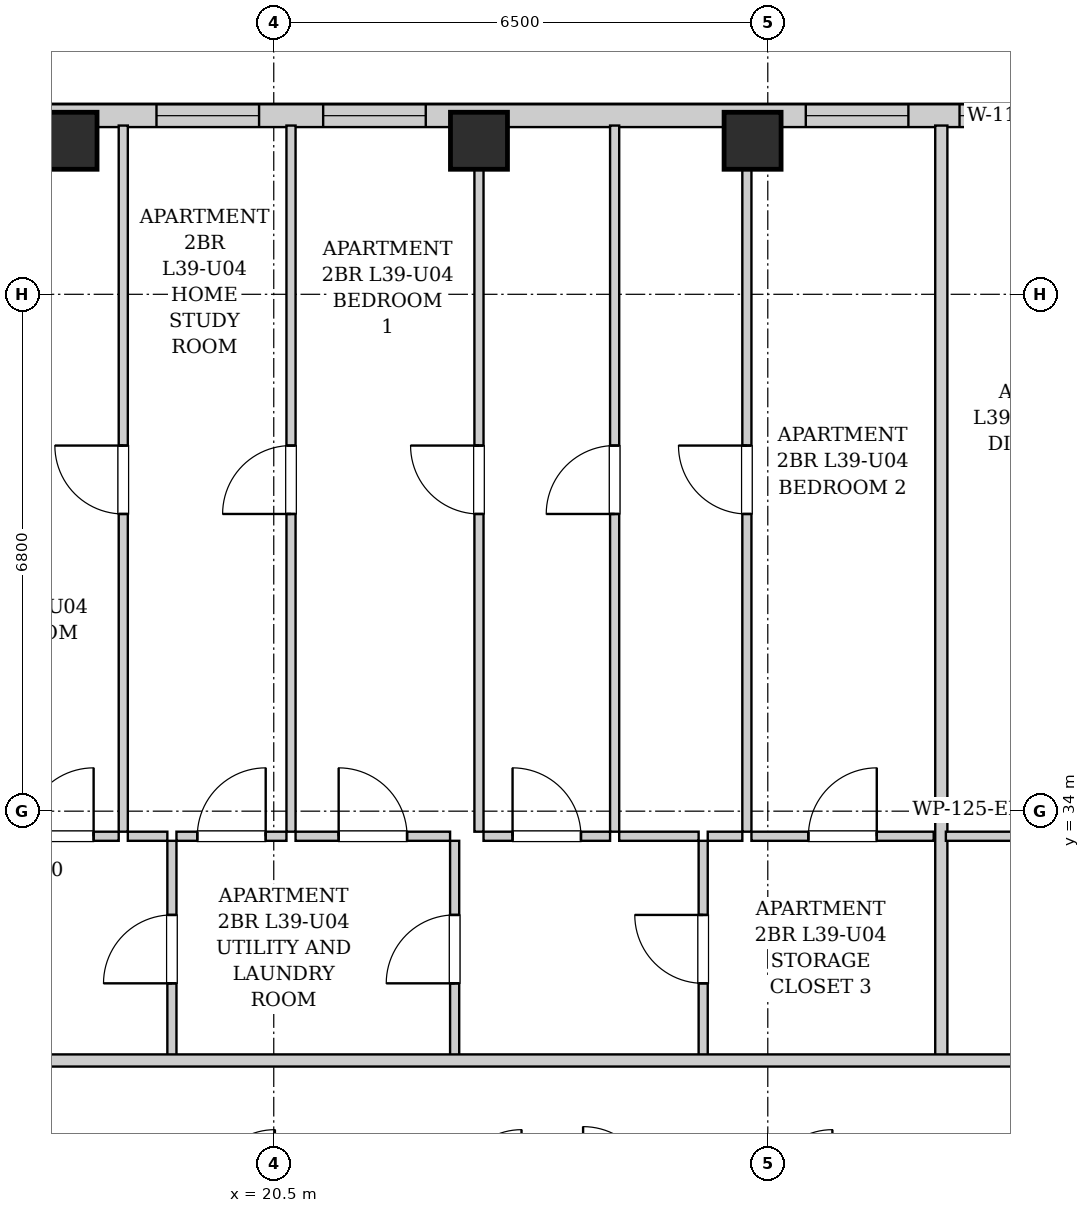
"""IFC4 building model, lengths in metres.
Left out: names, types, materials, properties, quantities, classifications, styles, units other than length and angle.
Written with IfcOpenShell. Run it as: python <this file> out.ifc"""

import sys

from ifc_helpers import new_model, si_unit, direction, frame, frame_2d, origin, origin_2d, place, context, subcontext, project, spatial, rectangle, extrude, element, fill, save


model = new_model("IFC4")
c1 = context("Model", 3, precision=1e-05, world=origin(), true_north=direction((0.0, 1.0)))
c2 = subcontext(c1, "Body", "Model", "MODEL_VIEW")
j1 = project(units=[si_unit("LENGTHUNIT", "METRE"), si_unit("PLANEANGLEUNIT", "RADIAN")], contexts=[c1])
p1 = place(None, origin())
s1 = spatial("IfcSite", under=j1, at=p1, CompositionType="ELEMENT")
p2 = place(p1, origin())
s2 = spatial("IfcBuilding", under=s1, at=p2, CompositionType="ELEMENT")
p3 = place(p2, frame((0.0, 0.0, 137.4)))
s3 = spatial("IfcBuildingStorey", under=s2, at=p3, CompositionType="ELEMENT", Elevation=137.4)
for number, where, z_axis, x_axis in (
    (1, (17.8, 42.82, 0.0), (0.0, 0.0, 1.0), (1.0, 0.0, 0.0)),
    (2, (23.2, 42.82, 0.0), (0.0, 0.0, 1.0), (1.0, 0.0, 0.0)),
    (3, (26.8, 42.82, 0.0), (0.0, 0.0, 1.0), (1.0, 0.0, 0.0)),
):
    element("IfcColumn", number, at=place(p3, frame(where, z_axis=z_axis, x_axis=x_axis)), inside=s3, PredefinedType="COLUMN", context=c2, shape_type="SweptSolid", body=[
        extrude(rectangle(XDim=0.75, YDim=0.75, at=origin_2d()), origin(), (0.0, 0.0, 1.0), 3.25),
    ])
p4 = place(p3, frame((16.6, 43.15, 0.0), z_axis=(0.0, 0.0, 1.0), x_axis=(1.0, 0.0, 0.0)))
e4 = element("IfcWall", 4, at=p4, inside=s3, PredefinedType="SOLIDWALL", context=c2, shape_type="SweptSolid", body=[
    extrude(rectangle(XDim=14.1, YDim=0.3, at=frame_2d((7.05, 0.0))), origin(), (0.0, 0.0, 1.0), 2.99),
])
p5 = place(p4, frame((2.357, 0.0, 0.55)))
e5 = element("IfcOpeningElement", 5, at=p5, cuts=e4, PredefinedType="OPENING", context=c2, shape_type="SweptSolid", body=[
    extrude(rectangle(XDim=1.35, YDim=1.2, at=frame_2d((0.675, 0.6))), frame((0.0, 0.16, 0.0), z_axis=(0.0, -1.0, 0.0), x_axis=(1.0, 0.0, 0.0)), (0.0, 0.0, 1.0), 0.32),
])
p6 = place(p4, frame((4.55, 0.0, 0.55)))
e6 = element("IfcOpeningElement", 6, at=p6, cuts=e4, PredefinedType="OPENING", context=c2, shape_type="SweptSolid", body=[
    extrude(rectangle(XDim=1.35, YDim=1.2, at=frame_2d((0.675, 0.6))), frame((0.0, 0.16, 0.0), z_axis=(0.0, -1.0, 0.0), x_axis=(1.0, 0.0, 0.0)), (0.0, 0.0, 1.0), 0.32),
])
p7 = place(p4, frame((10.9, 0.0, 0.55)))
e7 = element("IfcOpeningElement", 7, at=p7, cuts=e4, PredefinedType="OPENING", context=c2, shape_type="SweptSolid", body=[
    extrude(rectangle(XDim=1.35, YDim=1.2, at=frame_2d((0.675, 0.6))), frame((0.0, 0.16, 0.0), z_axis=(0.0, -1.0, 0.0), x_axis=(1.0, 0.0, 0.0)), (0.0, 0.0, 1.0), 0.32),
])
p8 = place(p4, frame((12.923, 0.0, 0.55)))
e8 = element("IfcOpeningElement", 8, at=p8, cuts=e4, PredefinedType="OPENING", context=c2, shape_type="SweptSolid", body=[
    extrude(rectangle(XDim=0.85, YDim=1.2, at=frame_2d((0.425, 0.6))), frame((0.0, 0.16, 0.0), z_axis=(0.0, -1.0, 0.0), x_axis=(1.0, 0.0, 0.0)), (0.0, 0.0, 1.0), 0.32),
])
p9 = place(p3, frame((19.16, 30.76, 0.0), z_axis=(0.0, 0.0, 1.0), x_axis=(0.0, 1.0, 0.0)))
e9 = element("IfcWall", 9, at=p9, inside=s3, PredefinedType="PARTITIONING", context=c2, shape_type="SweptSolid", body=[
    extrude(rectangle(XDim=2.85, YDim=0.12, at=frame_2d((1.425, 0.0))), origin(), (0.0, 0.0, 1.0), 2.99),
])
p10 = place(p9, frame((0.975, 0.0, 0.0)))
e10 = element("IfcOpeningElement", 10, at=p10, cuts=e9, PredefinedType="OPENING", context=c2, shape_type="SweptSolid", body=[
    extrude(rectangle(XDim=0.9, YDim=2.05, at=frame_2d((0.45, 1.025))), frame((0.0, 0.07, 0.0), z_axis=(0.0, -1.0, 0.0), x_axis=(1.0, 0.0, 0.0)), (0.0, 0.0, 1.0), 0.14),
])
p11 = place(p3, frame((16.9, 33.67, 0.0), z_axis=(0.0, 0.0, 1.0), x_axis=(1.0, 0.0, 0.0)))
e11 = element("IfcWall", 11, at=p11, inside=s3, PredefinedType="PARTITIONING", context=c2, shape_type="SweptSolid", body=[
    extrude(rectangle(XDim=1.56, YDim=0.12, at=frame_2d((0.78, 0.0))), origin(), (0.0, 0.0, 1.0), 2.99),
])
p12 = place(p11, frame((0.33, 0.0, 0.0)))
e12 = element("IfcOpeningElement", 12, at=p12, cuts=e11, PredefinedType="OPENING", context=c2, shape_type="SweptSolid", body=[
    extrude(rectangle(XDim=0.9, YDim=2.05, at=frame_2d((0.45, 1.025))), frame((0.0, 0.07, 0.0), z_axis=(0.0, -1.0, 0.0), x_axis=(1.0, 0.0, 0.0)), (0.0, 0.0, 1.0), 0.14),
])
p13 = place(p3, frame((18.58, 33.67, 0.0), z_axis=(0.0, 0.0, 1.0), x_axis=(1.0, 0.0, 0.0)))
e13 = element("IfcWall", 13, at=p13, inside=s3, PredefinedType="PARTITIONING", context=c2, shape_type="SweptSolid", body=[
    extrude(rectangle(XDim=0.52, YDim=0.12, at=frame_2d((0.26, 0.0))), origin(), (0.0, 0.0, 1.0), 2.99),
])
p14 = place(p3, frame((22.88, 30.76, 0.0), z_axis=(0.0, 0.0, 1.0), x_axis=(0.0, 1.0, 0.0)))
e14 = element("IfcWall", 14, at=p14, inside=s3, PredefinedType="PARTITIONING", context=c2, shape_type="SweptSolid", body=[
    extrude(rectangle(XDim=2.85, YDim=0.12, at=frame_2d((1.425, 0.0))), origin(), (0.0, 0.0, 1.0), 2.99),
])
p15 = place(p14, frame((0.975, 0.0, 0.0)))
e15 = element("IfcOpeningElement", 15, at=p15, cuts=e14, PredefinedType="OPENING", context=c2, shape_type="SweptSolid", body=[
    extrude(rectangle(XDim=0.9, YDim=2.05, at=frame_2d((0.45, 1.025))), frame((0.0, 0.07, 0.0), z_axis=(0.0, -1.0, 0.0), x_axis=(1.0, 0.0, 0.0)), (0.0, 0.0, 1.0), 0.14),
])
p16 = place(p3, frame((19.22, 33.67, 0.0), z_axis=(0.0, 0.0, 1.0), x_axis=(1.0, 0.0, 0.0)))
e16 = element("IfcWall", 16, at=p16, inside=s3, PredefinedType="PARTITIONING", context=c2, shape_type="SweptSolid", body=[
    extrude(rectangle(XDim=1.447, YDim=0.12, at=frame_2d((0.724, 0.0))), origin(), (0.0, 0.0, 1.0), 2.99),
])
p17 = place(p16, frame((0.274, 0.0, 0.0)))
e17 = element("IfcOpeningElement", 17, at=p17, cuts=e16, PredefinedType="OPENING", context=c2, shape_type="SweptSolid", body=[
    extrude(rectangle(XDim=0.9, YDim=2.05, at=frame_2d((0.45, 1.025))), frame((0.0, 0.07, 0.0), z_axis=(0.0, -1.0, 0.0), x_axis=(1.0, 0.0, 0.0)), (0.0, 0.0, 1.0), 0.14),
])
p18 = place(p3, frame((20.787, 33.67, 0.0), z_axis=(0.0, 0.0, 1.0), x_axis=(1.0, 0.0, 0.0)))
e18 = element("IfcWall", 18, at=p18, inside=s3, PredefinedType="PARTITIONING", context=c2, shape_type="SweptSolid", body=[
    extrude(rectangle(XDim=2.033, YDim=0.12, at=frame_2d((1.017, 0.0))), origin(), (0.0, 0.0, 1.0), 2.99),
])
p19 = place(p18, frame((0.567, 0.0, 0.0)))
e19 = element("IfcOpeningElement", 19, at=p19, cuts=e18, PredefinedType="OPENING", context=c2, shape_type="SweptSolid", body=[
    extrude(rectangle(XDim=0.9, YDim=2.05, at=frame_2d((0.45, 1.025))), frame((0.0, 0.07, 0.0), z_axis=(0.0, -1.0, 0.0), x_axis=(1.0, 0.0, 0.0)), (0.0, 0.0, 1.0), 0.14),
])
p20 = place(p3, frame((26.15, 30.76, 0.0), z_axis=(0.0, 0.0, 1.0), x_axis=(0.0, 1.0, 0.0)))
e20 = element("IfcWall", 20, at=p20, inside=s3, PredefinedType="PARTITIONING", context=c2, shape_type="SweptSolid", body=[
    extrude(rectangle(XDim=2.85, YDim=0.12, at=frame_2d((1.425, 0.0))), origin(), (0.0, 0.0, 1.0), 2.99),
])
p21 = place(p20, frame((0.975, 0.0, 0.0)))
e21 = element("IfcOpeningElement", 21, at=p21, cuts=e20, PredefinedType="OPENING", context=c2, shape_type="SweptSolid", body=[
    extrude(rectangle(XDim=0.9, YDim=2.05, at=frame_2d((0.45, 1.025))), frame((0.0, 0.07, 0.0), z_axis=(0.0, -1.0, 0.0), x_axis=(1.0, 0.0, 0.0)), (0.0, 0.0, 1.0), 0.14),
])
p22 = place(p3, frame((23.26, 33.67, 0.0), z_axis=(0.0, 0.0, 1.0), x_axis=(1.0, 0.0, 0.0)))
e22 = element("IfcWall", 22, at=p22, inside=s3, PredefinedType="PARTITIONING", context=c2, shape_type="SweptSolid", body=[
    extrude(rectangle(XDim=1.665, YDim=0.12, at=frame_2d((0.833, 0.0))), origin(), (0.0, 0.0, 1.0), 2.99),
])
p23 = place(p22, frame((0.382, 0.0, 0.0)))
e23 = element("IfcOpeningElement", 23, at=p23, cuts=e22, PredefinedType="OPENING", context=c2, shape_type="SweptSolid", body=[
    extrude(rectangle(XDim=0.9, YDim=2.05, at=frame_2d((0.45, 1.025))), frame((0.0, 0.07, 0.0), z_axis=(0.0, -1.0, 0.0), x_axis=(1.0, 0.0, 0.0)), (0.0, 0.0, 1.0), 0.14),
])
p24 = place(p3, frame((25.045, 33.67, 0.0), z_axis=(0.0, 0.0, 1.0), x_axis=(1.0, 0.0, 0.0)))
e24 = element("IfcWall", 24, at=p24, inside=s3, PredefinedType="PARTITIONING", context=c2, shape_type="SweptSolid", body=[
    extrude(rectangle(XDim=1.045, YDim=0.12, at=frame_2d((0.522, 0.0))), origin(), (0.0, 0.0, 1.0), 2.99),
])
p25 = place(p3, frame((26.21, 33.67, 0.0), z_axis=(0.0, 0.0, 1.0), x_axis=(1.0, 0.0, 0.0)))
e25 = element("IfcWall", 25, at=p25, inside=s3, PredefinedType="PARTITIONING", context=c2, shape_type="SweptSolid", body=[
    extrude(rectangle(XDim=0.455, YDim=0.12, at=frame_2d((0.228, 0.0))), origin(), (0.0, 0.0, 1.0), 2.99),
])
p26 = place(p3, frame((26.785, 33.67, 0.0), z_axis=(0.0, 0.0, 1.0), x_axis=(1.0, 0.0, 0.0)))
e26 = element("IfcWall", 26, at=p26, inside=s3, PredefinedType="PARTITIONING", context=c2, shape_type="SweptSolid", body=[
    extrude(rectangle(XDim=2.398, YDim=0.12, at=frame_2d((1.199, 0.0))), origin(), (0.0, 0.0, 1.0), 2.99),
])
p27 = place(p26, frame((0.749, 0.0, 0.0)))
e27 = element("IfcOpeningElement", 27, at=p27, cuts=e26, PredefinedType="OPENING", context=c2, shape_type="SweptSolid", body=[
    extrude(rectangle(XDim=0.9, YDim=2.05, at=frame_2d((0.45, 1.025))), frame((0.0, 0.07, 0.0), z_axis=(0.0, -1.0, 0.0), x_axis=(1.0, 0.0, 0.0)), (0.0, 0.0, 1.0), 0.14),
])
p28 = place(p3, frame((18.52, 33.73, 0.0), z_axis=(0.0, 0.0, 1.0), x_axis=(0.0, 1.0, 0.0)))
e28 = element("IfcWall", 28, at=p28, inside=s3, PredefinedType="PARTITIONING", context=c2, shape_type="SweptSolid", body=[
    extrude(rectangle(XDim=9.29, YDim=0.12, at=frame_2d((4.645, 0.0))), origin(), (0.0, 0.0, 1.0), 2.99),
])
p29 = place(p28, frame((4.18, 0.0, 0.0)))
e29 = element("IfcOpeningElement", 29, at=p29, cuts=e28, PredefinedType="OPENING", context=c2, shape_type="SweptSolid", body=[
    extrude(rectangle(XDim=0.9, YDim=2.05, at=frame_2d((0.45, 1.025))), frame((0.0, 0.07, 0.0), z_axis=(0.0, -1.0, 0.0), x_axis=(1.0, 0.0, 0.0)), (0.0, 0.0, 1.0), 0.14),
])
p30 = place(p3, frame((20.727, 33.73, 0.0), z_axis=(0.0, 0.0, 1.0), x_axis=(0.0, 1.0, 0.0)))
e30 = element("IfcWall", 30, at=p30, inside=s3, PredefinedType="PARTITIONING", context=c2, shape_type="SweptSolid", body=[
    extrude(rectangle(XDim=9.29, YDim=0.12, at=frame_2d((4.645, 0.0))), origin(), (0.0, 0.0, 1.0), 2.99),
])
p31 = place(p30, frame((4.18, 0.0, 0.0)))
e31 = element("IfcOpeningElement", 31, at=p31, cuts=e30, PredefinedType="OPENING", context=c2, shape_type="SweptSolid", body=[
    extrude(rectangle(XDim=0.9, YDim=2.05, at=frame_2d((0.45, 1.025))), frame((0.0, 0.07, 0.0), z_axis=(0.0, -1.0, 0.0), x_axis=(1.0, 0.0, 0.0)), (0.0, 0.0, 1.0), 0.14),
])
p32 = place(p3, frame((23.2, 33.73, 0.0), z_axis=(0.0, 0.0, 1.0), x_axis=(0.0, 1.0, 0.0)))
e32 = element("IfcWall", 32, at=p32, inside=s3, PredefinedType="PARTITIONING", context=c2, shape_type="SweptSolid", body=[
    extrude(rectangle(XDim=9.29, YDim=0.12, at=frame_2d((4.645, 0.0))), origin(), (0.0, 0.0, 1.0), 2.99),
])
p33 = place(p32, frame((4.18, 0.0, 0.0)))
e33 = element("IfcOpeningElement", 33, at=p33, cuts=e32, PredefinedType="OPENING", context=c2, shape_type="SweptSolid", body=[
    extrude(rectangle(XDim=0.9, YDim=2.05, at=frame_2d((0.45, 1.025))), frame((0.0, 0.07, 0.0), z_axis=(0.0, -1.0, 0.0), x_axis=(1.0, 0.0, 0.0)), (0.0, 0.0, 1.0), 0.14),
])
p34 = place(p3, frame((24.985, 33.73, 0.0), z_axis=(0.0, 0.0, 1.0), x_axis=(0.0, 1.0, 0.0)))
e34 = element("IfcWall", 34, at=p34, inside=s3, PredefinedType="PARTITIONING", context=c2, shape_type="SweptSolid", body=[
    extrude(rectangle(XDim=9.29, YDim=0.12, at=frame_2d((4.645, 0.0))), origin(), (0.0, 0.0, 1.0), 2.99),
])
p35 = place(p34, frame((4.18, 0.0, 0.0)))
e35 = element("IfcOpeningElement", 35, at=p35, cuts=e34, PredefinedType="OPENING", context=c2, shape_type="SweptSolid", body=[
    extrude(rectangle(XDim=0.9, YDim=2.05, at=frame_2d((0.45, 1.025))), frame((0.0, 0.07, 0.0), z_axis=(0.0, -1.0, 0.0), x_axis=(1.0, 0.0, 0.0)), (0.0, 0.0, 1.0), 0.14),
])
p36 = place(p3, frame((26.725, 33.73, 0.0), z_axis=(0.0, 0.0, 1.0), x_axis=(0.0, 1.0, 0.0)))
e36 = element("IfcWall", 36, at=p36, inside=s3, PredefinedType="PARTITIONING", context=c2, shape_type="SweptSolid", body=[
    extrude(rectangle(XDim=9.29, YDim=0.12, at=frame_2d((4.645, 0.0))), origin(), (0.0, 0.0, 1.0), 2.99),
])
p37 = place(p36, frame((4.18, 0.0, 0.0)))
e37 = element("IfcOpeningElement", 37, at=p37, cuts=e36, PredefinedType="OPENING", context=c2, shape_type="SweptSolid", body=[
    extrude(rectangle(XDim=0.9, YDim=2.05, at=frame_2d((0.45, 1.025))), frame((0.0, 0.07, 0.0), z_axis=(0.0, -1.0, 0.0), x_axis=(1.0, 0.0, 0.0)), (0.0, 0.0, 1.0), 0.14),
])
p38 = place(p3, frame((29.283, 30.76, 0.0), z_axis=(0.0, 0.0, 1.0), x_axis=(0.0, 1.0, 0.0)))
e38 = element("IfcWall", 38, at=p38, inside=s3, PredefinedType="PARTITIONING", context=c2, shape_type="SweptSolid", body=[
    extrude(rectangle(XDim=12.26, YDim=0.16, at=frame_2d((6.13, 0.0))), origin(), (0.0, 0.0, 1.0), 2.99),
])
p39 = place(p3, frame((29.343, 33.67, 0.0), z_axis=(0.0, 0.0, 1.0), x_axis=(1.0, 0.0, 0.0)))
e39 = element("IfcWall", 39, at=p39, inside=s3, PredefinedType="PARTITIONING", context=c2, shape_type="SweptSolid", body=[
    extrude(rectangle(XDim=2.4, YDim=0.12, at=frame_2d((1.2, 0.0))), origin(), (0.0, 0.0, 1.0), 2.99),
])
p40 = place(p3, frame((10.05, 30.72, 0.0), z_axis=(0.0, 0.0, 1.0), x_axis=(1.0, 0.0, 0.0)))
e40 = element("IfcWall", 40, at=p40, inside=s3, PredefinedType="PARTITIONING", context=c2, shape_type="SweptSolid", body=[
    extrude(rectangle(XDim=27.7, YDim=0.16, at=frame_2d((13.85, 0.0))), origin(), (0.0, 0.0, 1.0), 2.99),
])
p41 = place(p40, frame((4.165, 0.0, 0.0)))
e41 = element("IfcOpeningElement", 41, at=p41, cuts=e40, PredefinedType="OPENING", context=c2, shape_type="SweptSolid", body=[
    extrude(rectangle(XDim=0.95, YDim=2.1, at=frame_2d((0.475, 1.05))), frame((0.0, 0.09, 0.0), z_axis=(0.0, -1.0, 0.0), x_axis=(1.0, 0.0, 0.0)), (0.0, 0.0, 1.0), 0.18),
])
p42 = place(p40, frame((23.785, 0.0, 0.0)))
e42 = element("IfcOpeningElement", 42, at=p42, cuts=e40, PredefinedType="OPENING", context=c2, shape_type="SweptSolid", body=[
    extrude(rectangle(XDim=0.95, YDim=2.1, at=frame_2d((0.475, 1.05))), frame((0.0, 0.09, 0.0), z_axis=(0.0, -1.0, 0.0), x_axis=(1.0, 0.0, 0.0)), (0.0, 0.0, 1.0), 0.18),
])
p43 = place(p10, origin())
e43 = element("IfcDoor", 43, at=p43, inside=s3, OperationType="SINGLE_SWING_LEFT", PredefinedType="DOOR", context=c2, shape_type="SweptSolid", body=[
    extrude(rectangle(XDim=0.9, YDim=2.05, at=frame_2d((0.45, 1.025))), frame((0.0, 0.025, 0.0), z_axis=(0.0, -1.0, 0.0), x_axis=(1.0, 0.0, 0.0)), (0.0, 0.0, 1.0), 0.05),
])
fill(e10, e43)
p44 = place(p12, origin())
e44 = element("IfcDoor", 44, at=p44, inside=s3, OperationType="SINGLE_SWING_RIGHT", PredefinedType="DOOR", context=c2, shape_type="SweptSolid", body=[
    extrude(rectangle(XDim=0.9, YDim=2.05, at=frame_2d((0.45, 1.025))), frame((0.0, 0.025, 0.0), z_axis=(0.0, -1.0, 0.0), x_axis=(1.0, 0.0, 0.0)), (0.0, 0.0, 1.0), 0.05),
])
fill(e12, e44)
p45 = place(p15, origin())
e45 = element("IfcDoor", 45, at=p45, inside=s3, OperationType="SINGLE_SWING_LEFT", PredefinedType="DOOR", context=c2, shape_type="SweptSolid", body=[
    extrude(rectangle(XDim=0.9, YDim=2.05, at=frame_2d((0.45, 1.025))), frame((0.0, 0.025, 0.0), z_axis=(0.0, -1.0, 0.0), x_axis=(1.0, 0.0, 0.0)), (0.0, 0.0, 1.0), 0.05),
])
fill(e15, e45)
p46 = place(p17, origin())
e46 = element("IfcDoor", 46, at=p46, inside=s3, OperationType="SINGLE_SWING_RIGHT", PredefinedType="DOOR", context=c2, shape_type="SweptSolid", body=[
    extrude(rectangle(XDim=0.9, YDim=2.05, at=frame_2d((0.45, 1.025))), frame((0.0, 0.025, 0.0), z_axis=(0.0, -1.0, 0.0), x_axis=(1.0, 0.0, 0.0)), (0.0, 0.0, 1.0), 0.05),
])
fill(e17, e46)
p47 = place(p19, origin())
e47 = element("IfcDoor", 47, at=p47, inside=s3, OperationType="SINGLE_SWING_LEFT", PredefinedType="DOOR", context=c2, shape_type="SweptSolid", body=[
    extrude(rectangle(XDim=0.9, YDim=2.05, at=frame_2d((0.45, 1.025))), frame((0.0, 0.025, 0.0), z_axis=(0.0, -1.0, 0.0), x_axis=(1.0, 0.0, 0.0)), (0.0, 0.0, 1.0), 0.05),
])
fill(e19, e47)
p48 = place(p21, origin())
e48 = element("IfcDoor", 48, at=p48, inside=s3, OperationType="SINGLE_SWING_RIGHT", PredefinedType="DOOR", context=c2, shape_type="SweptSolid", body=[
    extrude(rectangle(XDim=0.9, YDim=2.05, at=frame_2d((0.45, 1.025))), frame((0.0, 0.025, 0.0), z_axis=(0.0, -1.0, 0.0), x_axis=(1.0, 0.0, 0.0)), (0.0, 0.0, 1.0), 0.05),
])
fill(e21, e48)
p49 = place(p23, origin())
e49 = element("IfcDoor", 49, at=p49, inside=s3, OperationType="SINGLE_SWING_LEFT", PredefinedType="DOOR", context=c2, shape_type="SweptSolid", body=[
    extrude(rectangle(XDim=0.9, YDim=2.05, at=frame_2d((0.45, 1.025))), frame((0.0, 0.025, 0.0), z_axis=(0.0, -1.0, 0.0), x_axis=(1.0, 0.0, 0.0)), (0.0, 0.0, 1.0), 0.05),
])
fill(e23, e49)
p50 = place(p27, origin())
e50 = element("IfcDoor", 50, at=p50, inside=s3, OperationType="SINGLE_SWING_RIGHT", PredefinedType="DOOR", context=c2, shape_type="SweptSolid", body=[
    extrude(rectangle(XDim=0.9, YDim=2.05, at=frame_2d((0.45, 1.025))), frame((0.0, 0.025, 0.0), z_axis=(0.0, -1.0, 0.0), x_axis=(1.0, 0.0, 0.0)), (0.0, 0.0, 1.0), 0.05),
])
fill(e27, e50)
p51 = place(p29, origin())
e51 = element("IfcDoor", 51, at=p51, inside=s3, OperationType="SINGLE_SWING_RIGHT", PredefinedType="DOOR", context=c2, shape_type="SweptSolid", body=[
    extrude(rectangle(XDim=0.9, YDim=2.05, at=frame_2d((0.45, 1.025))), frame((0.0, 0.025, 0.0), z_axis=(0.0, -1.0, 0.0), x_axis=(1.0, 0.0, 0.0)), (0.0, 0.0, 1.0), 0.05),
])
fill(e29, e51)
p52 = place(p31, origin())
e52 = element("IfcDoor", 52, at=p52, inside=s3, OperationType="SINGLE_SWING_LEFT", PredefinedType="DOOR", context=c2, shape_type="SweptSolid", body=[
    extrude(rectangle(XDim=0.9, YDim=2.05, at=frame_2d((0.45, 1.025))), frame((0.0, 0.025, 0.0), z_axis=(0.0, -1.0, 0.0), x_axis=(1.0, 0.0, 0.0)), (0.0, 0.0, 1.0), 0.05),
])
fill(e31, e52)
p53 = place(p33, origin())
e53 = element("IfcDoor", 53, at=p53, inside=s3, OperationType="SINGLE_SWING_RIGHT", PredefinedType="DOOR", context=c2, shape_type="SweptSolid", body=[
    extrude(rectangle(XDim=0.9, YDim=2.05, at=frame_2d((0.45, 1.025))), frame((0.0, 0.025, 0.0), z_axis=(0.0, -1.0, 0.0), x_axis=(1.0, 0.0, 0.0)), (0.0, 0.0, 1.0), 0.05),
])
fill(e33, e53)
p54 = place(p35, origin())
e54 = element("IfcDoor", 54, at=p54, inside=s3, OperationType="SINGLE_SWING_LEFT", PredefinedType="DOOR", context=c2, shape_type="SweptSolid", body=[
    extrude(rectangle(XDim=0.9, YDim=2.05, at=frame_2d((0.45, 1.025))), frame((0.0, 0.025, 0.0), z_axis=(0.0, -1.0, 0.0), x_axis=(1.0, 0.0, 0.0)), (0.0, 0.0, 1.0), 0.05),
])
fill(e35, e54)
p55 = place(p37, origin())
e55 = element("IfcDoor", 55, at=p55, inside=s3, OperationType="SINGLE_SWING_RIGHT", PredefinedType="DOOR", context=c2, shape_type="SweptSolid", body=[
    extrude(rectangle(XDim=0.9, YDim=2.05, at=frame_2d((0.45, 1.025))), frame((0.0, 0.025, 0.0), z_axis=(0.0, -1.0, 0.0), x_axis=(1.0, 0.0, 0.0)), (0.0, 0.0, 1.0), 0.05),
])
fill(e37, e55)
p56 = place(p5, origin())
e56 = element("IfcWindow", 56, at=p56, inside=s3, PartitioningType="SINGLE_PANEL", PredefinedType="WINDOW", context=c2, shape_type="SweptSolid", body=[
    extrude(rectangle(XDim=1.35, YDim=1.2, at=frame_2d((0.675, 0.6))), frame((0.0, 0.03, 0.0), z_axis=(0.0, -1.0, 0.0), x_axis=(1.0, 0.0, 0.0)), (0.0, 0.0, 1.0), 0.06),
])
fill(e5, e56)
p57 = place(p6, origin())
e57 = element("IfcWindow", 57, at=p57, inside=s3, PartitioningType="SINGLE_PANEL", PredefinedType="WINDOW", context=c2, shape_type="SweptSolid", body=[
    extrude(rectangle(XDim=1.35, YDim=1.2, at=frame_2d((0.675, 0.6))), frame((0.0, 0.03, 0.0), z_axis=(0.0, -1.0, 0.0), x_axis=(1.0, 0.0, 0.0)), (0.0, 0.0, 1.0), 0.06),
])
fill(e6, e57)
p58 = place(p7, origin())
e58 = element("IfcWindow", 58, at=p58, inside=s3, PartitioningType="SINGLE_PANEL", PredefinedType="WINDOW", context=c2, shape_type="SweptSolid", body=[
    extrude(rectangle(XDim=1.35, YDim=1.2, at=frame_2d((0.675, 0.6))), frame((0.0, 0.03, 0.0), z_axis=(0.0, -1.0, 0.0), x_axis=(1.0, 0.0, 0.0)), (0.0, 0.0, 1.0), 0.06),
])
fill(e7, e58)
p59 = place(p8, origin())
e59 = element("IfcWindow", 59, at=p59, inside=s3, PartitioningType="SINGLE_PANEL", PredefinedType="WINDOW", context=c2, shape_type="SweptSolid", body=[
    extrude(rectangle(XDim=0.85, YDim=1.2, at=frame_2d((0.425, 0.6))), frame((0.0, 0.03, 0.0), z_axis=(0.0, -1.0, 0.0), x_axis=(1.0, 0.0, 0.0)), (0.0, 0.0, 1.0), 0.06),
])
fill(e8, e59)
save(model, sys.argv[1])
